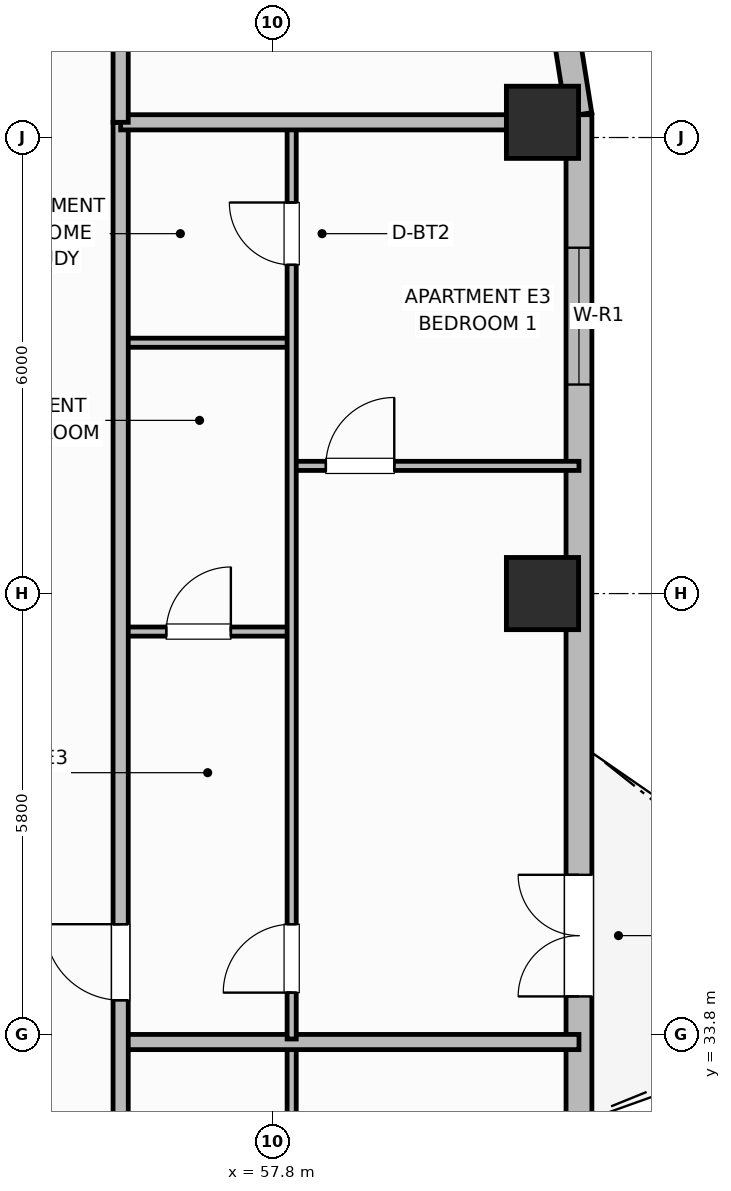
"""IFC4 building model, lengths in metres.
Left out: names, types, materials, properties, quantities, classifications, styles, units other than length and angle.
Written with IfcOpenShell. Run it as: python <this file> out.ifc"""

import sys

from ifc_helpers import new_model, si_unit, direction, frame, frame_2d, origin, origin_2d, place, context, subcontext, project, spatial, rectangle, extrude, element, fill, save


model = new_model("IFC4")
c1 = context("Model", 3, precision=1e-05, world=origin(), true_north=direction((0.0, 1.0)))
c2 = subcontext(c1, "Body", "Model", "MODEL_VIEW")
j1 = project(units=[si_unit("LENGTHUNIT", "METRE"), si_unit("PLANEANGLEUNIT", "RADIAN")], contexts=[c1])
p1 = place(None, origin())
s1 = spatial("IfcSite", under=j1, at=p1, CompositionType="ELEMENT")
p2 = place(p1, origin())
s2 = spatial("IfcBuilding", under=s1, at=p2, CompositionType="ELEMENT")
p3 = place(p2, frame((0.0, 0.0, 192.2)))
s3 = spatial("IfcBuildingStorey", under=s2, at=p3, CompositionType="ELEMENT", Elevation=192.2)
for number, where, z_axis, x_axis in (
    (1, (61.35, 39.6, 0.0), (0.0, 0.0, 1.0), (1.0, 0.0, 0.0)),
    (2, (61.35, 45.8, 0.0), (0.0, 0.0, 1.0), (1.0, 0.0, 0.0)),
):
    element("IfcColumn", number, at=place(p3, frame(where, z_axis=z_axis, x_axis=x_axis)), inside=s3, PredefinedType="COLUMN", context=c2, shape_type="SweptSolid", body=[
        extrude(rectangle(XDim=0.95, YDim=0.95, at=origin_2d()), origin(), (0.0, 0.0, 1.0), 3.7),
    ])
p4 = place(p3, frame((61.83, 32.6, 0.0), z_axis=(0.0, 0.0, 1.0), x_axis=(0.0, 1.0, 0.0)))
e3 = element("IfcWall", 3, at=p4, inside=s3, PredefinedType="SOLIDWALL", context=c2, shape_type="SweptSolid", body=[
    extrude(rectangle(XDim=13.3, YDim=0.34, at=frame_2d((6.65, 0.0))), origin(), (0.0, 0.0, 1.0), 2.66),
])
p5 = place(p4, frame((1.7, 0.0, 0.0)))
e4 = element("IfcOpeningElement", 4, at=p5, cuts=e3, PredefinedType="OPENING", context=c2, shape_type="SweptSolid", body=[
    extrude(rectangle(XDim=1.6, YDim=2.1, at=frame_2d((0.8, 1.05))), frame((0.0, 0.18, 0.0), z_axis=(0.0, -1.0, 0.0), x_axis=(1.0, 0.0, 0.0)), (0.0, 0.0, 1.0), 0.36),
])
p6 = place(p4, frame((9.75, 0.0, 0.69)))
e5 = element("IfcOpeningElement", 5, at=p6, cuts=e3, PredefinedType="OPENING", context=c2, shape_type="SweptSolid", body=[
    extrude(rectangle(XDim=1.8, YDim=1.85, at=frame_2d((0.9, 0.925))), frame((0.0, 0.18, 0.0), z_axis=(0.0, -1.0, 0.0), x_axis=(1.0, 0.0, 0.0)), (0.0, 0.0, 1.0), 0.36),
])
p7 = place(p3, frame((61.83, 45.9, 0.0), z_axis=(0.0, 0.0, 1.0), x_axis=(-0.156481329164, 0.987680916907, 0.0)))
e6 = element("IfcWall", 6, at=p7, inside=s3, PredefinedType="SOLIDWALL", context=c2, shape_type="SweptSolid", body=[
    extrude(rectangle(XDim=1.136, YDim=0.34, at=frame_2d((0.568, 0.0))), origin(), (0.0, 0.0, 1.0), 2.66),
])
p8 = place(p3, frame((58.05, 22.96, 0.0), z_axis=(0.0, 0.0, 1.0), x_axis=(0.0, 1.0, 0.0)))
e7 = element("IfcWall", 7, at=p8, inside=s3, PredefinedType="PARTITIONING", context=c2, shape_type="SweptSolid", body=[
    extrude(rectangle(XDim=10.7, YDim=0.12, at=frame_2d((5.35, 0.0))), origin(), (0.0, 0.0, 1.0), 2.49),
])
p9 = place(p8, frame((0.61, 0.0, 0.0)))
e8 = element("IfcOpeningElement", 8, at=p9, cuts=e7, PredefinedType="OPENING", context=c2, shape_type="SweptSolid", body=[
    extrude(rectangle(XDim=0.9, YDim=2.1, at=frame_2d((0.45, 1.05))), frame((0.0, 0.07, 0.0), z_axis=(0.0, -1.0, 0.0), x_axis=(1.0, 0.0, 0.0)), (0.0, 0.0, 1.0), 0.14),
])
p10 = place(p3, frame((55.8, 33.7, 0.0), z_axis=(0.0, 0.0, 1.0), x_axis=(1.0, 0.0, 0.0)))
e9 = element("IfcWall", 9, at=p10, inside=s3, PredefinedType="PARTITIONING", context=c2, shape_type="SweptSolid", body=[
    extrude(rectangle(XDim=6.03, YDim=0.2, at=frame_2d((3.015, 0.0))), origin(), (0.0, 0.0, 1.0), 2.49),
])
p11 = place(p3, frame((55.8, 39.1, 0.0), z_axis=(0.0, 0.0, 1.0), x_axis=(1.0, 0.0, 0.0)))
e10 = element("IfcWall", 10, at=p11, inside=s3, PredefinedType="PARTITIONING", context=c2, shape_type="SweptSolid", body=[
    extrude(rectangle(XDim=2.25, YDim=0.12, at=frame_2d((1.125, 0.0))), origin(), (0.0, 0.0, 1.0), 2.49),
])
p12 = place(p11, frame((0.6, 0.0, 0.0)))
e11 = element("IfcOpeningElement", 11, at=p12, cuts=e10, PredefinedType="OPENING", context=c2, shape_type="SweptSolid", body=[
    extrude(rectangle(XDim=0.85, YDim=2.1, at=frame_2d((0.425, 1.05))), frame((0.0, 0.07, 0.0), z_axis=(0.0, -1.0, 0.0), x_axis=(1.0, 0.0, 0.0)), (0.0, 0.0, 1.0), 0.14),
])
p13 = place(p3, frame((55.8, 42.9, 0.0), z_axis=(0.0, 0.0, 1.0), x_axis=(1.0, 0.0, 0.0)))
e12 = element("IfcWall", 12, at=p13, inside=s3, PredefinedType="PARTITIONING", context=c2, shape_type="SweptSolid", body=[
    extrude(rectangle(XDim=2.25, YDim=0.12, at=frame_2d((1.125, 0.0))), origin(), (0.0, 0.0, 1.0), 2.49),
])
p14 = place(p3, frame((58.05, 41.28, 0.0), z_axis=(0.0, 0.0, 1.0), x_axis=(1.0, 0.0, 0.0)))
e13 = element("IfcWall", 13, at=p14, inside=s3, PredefinedType="PARTITIONING", context=c2, shape_type="SweptSolid", body=[
    extrude(rectangle(XDim=3.78, YDim=0.12, at=frame_2d((1.89, 0.0))), origin(), (0.0, 0.0, 1.0), 2.49),
])
p15 = place(p14, frame((0.45, 0.0, 0.0)))
e14 = element("IfcOpeningElement", 14, at=p15, cuts=e13, PredefinedType="OPENING", context=c2, shape_type="SweptSolid", body=[
    extrude(rectangle(XDim=0.9, YDim=2.1, at=frame_2d((0.45, 1.05))), frame((0.0, 0.07, 0.0), z_axis=(0.0, -1.0, 0.0), x_axis=(1.0, 0.0, 0.0)), (0.0, 0.0, 1.0), 0.14),
])
p16 = place(p3, frame((58.05, 33.74, 0.0), z_axis=(0.0, 0.0, 1.0), x_axis=(0.0, 1.0, 0.0)))
e15 = element("IfcWall", 15, at=p16, inside=s3, PredefinedType="PARTITIONING", context=c2, shape_type="SweptSolid", body=[
    extrude(rectangle(XDim=12.02, YDim=0.12, at=frame_2d((6.01, 0.0))), origin(), (0.0, 0.0, 1.0), 2.49),
])
p17 = place(p16, frame((0.61, 0.0, 0.0)))
e16 = element("IfcOpeningElement", 16, at=p17, cuts=e15, PredefinedType="OPENING", context=c2, shape_type="SweptSolid", body=[
    extrude(rectangle(XDim=0.9, YDim=2.1, at=frame_2d((0.45, 1.05))), frame((0.0, 0.07, 0.0), z_axis=(0.0, -1.0, 0.0), x_axis=(1.0, 0.0, 0.0)), (0.0, 0.0, 1.0), 0.14),
])
p18 = place(p16, frame((10.185, 0.0, 0.0)))
e17 = element("IfcOpeningElement", 17, at=p18, cuts=e15, PredefinedType="OPENING", context=c2, shape_type="SweptSolid", body=[
    extrude(rectangle(XDim=0.82, YDim=2.08, at=frame_2d((0.41, 1.04))), frame((0.0, 0.07, 0.0), z_axis=(0.0, -1.0, 0.0), x_axis=(1.0, 0.0, 0.0)), (0.0, 0.0, 1.0), 0.14),
])
p19 = place(p3, frame((55.8, 10.6, 0.0), z_axis=(0.0, 0.0, 1.0), x_axis=(0.0, 1.0, 0.0)))
e18 = element("IfcWall", 18, at=p19, inside=s3, PredefinedType="PARTITIONING", context=c2, shape_type="SweptSolid", body=[
    extrude(rectangle(XDim=35.2, YDim=0.2, at=frame_2d((17.6, 0.0))), origin(), (0.0, 0.0, 1.0), 2.49),
])
p20 = place(p19, frame((2.65, 0.0, 0.0)))
e19 = element("IfcOpeningElement", 19, at=p20, cuts=e18, PredefinedType="OPENING", context=c2, shape_type="SweptSolid", body=[
    extrude(rectangle(XDim=1.0, YDim=2.15, at=frame_2d((0.5, 1.075))), frame((0.0, 0.11, 0.0), z_axis=(0.0, -1.0, 0.0), x_axis=(1.0, 0.0, 0.0)), (0.0, 0.0, 1.0), 0.22),
])
p21 = place(p19, frame((12.87, 0.0, 0.0)))
e20 = element("IfcOpeningElement", 20, at=p21, cuts=e18, PredefinedType="OPENING", context=c2, shape_type="SweptSolid", body=[
    extrude(rectangle(XDim=1.0, YDim=2.15, at=frame_2d((0.5, 1.075))), frame((0.0, 0.11, 0.0), z_axis=(0.0, -1.0, 0.0), x_axis=(1.0, 0.0, 0.0)), (0.0, 0.0, 1.0), 0.22),
])
p22 = place(p19, frame((23.65, 0.0, 0.0)))
e21 = element("IfcOpeningElement", 21, at=p22, cuts=e18, PredefinedType="OPENING", context=c2, shape_type="SweptSolid", body=[
    extrude(rectangle(XDim=1.0, YDim=2.15, at=frame_2d((0.5, 1.075))), frame((0.0, 0.11, 0.0), z_axis=(0.0, -1.0, 0.0), x_axis=(1.0, 0.0, 0.0)), (0.0, 0.0, 1.0), 0.22),
])
p23 = place(p3, frame((55.8, 45.8, 0.0), z_axis=(0.0, 0.0, 1.0), x_axis=(1.0, 0.0, 0.0)))
e22 = element("IfcWall", 22, at=p23, inside=s3, PredefinedType="PARTITIONING", context=c2, shape_type="SweptSolid", body=[
    extrude(rectangle(XDim=5.61, YDim=0.2, at=frame_2d((2.805, 0.0))), origin(), (0.0, 0.0, 1.0), 2.49),
])
p24 = place(p3, frame((55.8, 45.8, 0.0), z_axis=(0.0, 0.0, 1.0), x_axis=(0.0, 1.0, 0.0)))
e23 = element("IfcWall", 23, at=p24, inside=s3, PredefinedType="PARTITIONING", context=c2, shape_type="SweptSolid", body=[
    extrude(rectangle(XDim=3.73, YDim=0.2, at=frame_2d((1.865, 0.0))), origin(), (0.0, 0.0, 1.0), 2.49),
])
p25 = place(p5, origin())
e24 = element("IfcDoor", 24, at=p25, inside=s3, OperationType="DOUBLE_DOOR_SINGLE_SWING", PredefinedType="DOOR", context=c2, shape_type="SweptSolid", body=[
    extrude(rectangle(XDim=1.6, YDim=2.1, at=frame_2d((0.8, 1.05))), frame((0.0, 0.025, 0.0), z_axis=(0.0, -1.0, 0.0), x_axis=(1.0, 0.0, 0.0)), (0.0, 0.0, 1.0), 0.05),
])
fill(e4, e24)
p26 = place(p6, origin())
e25 = element("IfcWindow", 25, at=p26, inside=s3, PartitioningType="SINGLE_PANEL", PredefinedType="WINDOW", context=c2, shape_type="SweptSolid", body=[
    extrude(rectangle(XDim=1.8, YDim=1.85, at=frame_2d((0.9, 0.925))), frame((0.0, 0.03, 0.0), z_axis=(0.0, -1.0, 0.0), x_axis=(1.0, 0.0, 0.0)), (0.0, 0.0, 1.0), 0.06),
])
fill(e5, e25)
p27 = place(p12, origin())
e26 = element("IfcDoor", 26, at=p27, inside=s3, OperationType="SINGLE_SWING_RIGHT", PredefinedType="DOOR", context=c2, shape_type="SweptSolid", body=[
    extrude(rectangle(XDim=0.85, YDim=2.1, at=frame_2d((0.425, 1.05))), frame((0.0, 0.025, 0.0), z_axis=(0.0, -1.0, 0.0), x_axis=(1.0, 0.0, 0.0)), (0.0, 0.0, 1.0), 0.05),
])
fill(e11, e26)
p28 = place(p15, origin())
e27 = element("IfcDoor", 27, at=p28, inside=s3, OperationType="SINGLE_SWING_RIGHT", PredefinedType="DOOR", context=c2, shape_type="SweptSolid", body=[
    extrude(rectangle(XDim=0.9, YDim=2.1, at=frame_2d((0.45, 1.05))), frame((0.0, 0.025, 0.0), z_axis=(0.0, -1.0, 0.0), x_axis=(1.0, 0.0, 0.0)), (0.0, 0.0, 1.0), 0.05),
])
fill(e14, e27)
p29 = place(p17, origin())
e28 = element("IfcDoor", 28, at=p29, inside=s3, OperationType="SINGLE_SWING_LEFT", PredefinedType="DOOR", context=c2, shape_type="SweptSolid", body=[
    extrude(rectangle(XDim=0.9, YDim=2.1, at=frame_2d((0.45, 1.05))), frame((0.0, 0.025, 0.0), z_axis=(0.0, -1.0, 0.0), x_axis=(1.0, 0.0, 0.0)), (0.0, 0.0, 1.0), 0.05),
])
fill(e16, e28)
p30 = place(p18, origin())
e29 = element("IfcDoor", 29, at=p30, inside=s3, OperationType="SINGLE_SWING_RIGHT", PredefinedType="DOOR", context=c2, shape_type="SweptSolid", body=[
    extrude(rectangle(XDim=0.82, YDim=2.08, at=frame_2d((0.41, 1.04))), frame((0.0, 0.025, 0.0), z_axis=(0.0, -1.0, 0.0), x_axis=(1.0, 0.0, 0.0)), (0.0, 0.0, 1.0), 0.05),
])
fill(e17, e29)
p31 = place(p22, origin())
e30 = element("IfcDoor", 30, at=p31, inside=s3, OperationType="SINGLE_SWING_RIGHT", PredefinedType="DOOR", context=c2, shape_type="SweptSolid", body=[
    extrude(rectangle(XDim=1.0, YDim=2.15, at=frame_2d((0.5, 1.075))), frame((0.0, 0.025, 0.0), z_axis=(0.0, -1.0, 0.0), x_axis=(1.0, 0.0, 0.0)), (0.0, 0.0, 1.0), 0.05),
])
fill(e21, e30)
save(model, sys.argv[1])
